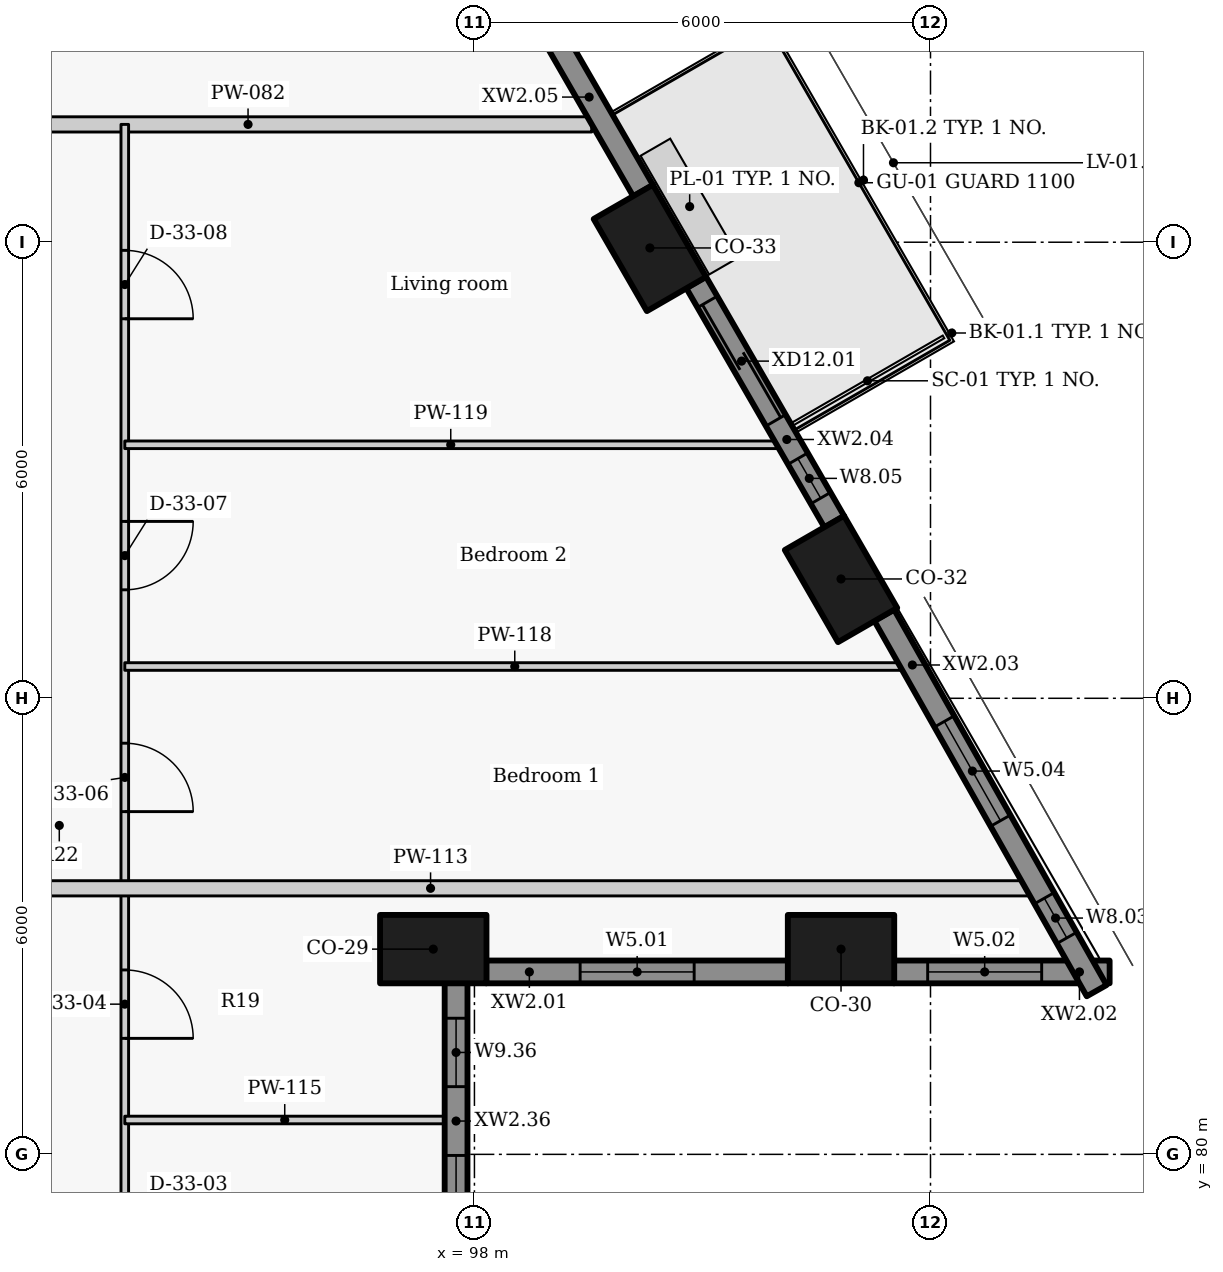
"""IFC4 building model, lengths in metres.
Left out: names, types, materials, properties, quantities, classifications, styles, units other than length and angle.
Written with IfcOpenShell. Run it as: python <this file> out.ifc"""

import sys

from ifc_helpers import new_model, si_unit, direction, frame, frame_2d, origin, origin_2d, place, context, subcontext, project, spatial, rectangle, extrude, element, fill, save


model = new_model("IFC4")
c1 = context("Model", 3, precision=1e-05, world=origin(), true_north=direction((0.0, 1.0)))
c2 = subcontext(c1, "Body", "Model", "MODEL_VIEW")
j1 = project(units=[si_unit("LENGTHUNIT", "METRE"), si_unit("PLANEANGLEUNIT", "RADIAN")], contexts=[c1])
p1 = place(None, origin())
s1 = spatial("IfcSite", under=j1, at=p1, CompositionType="ELEMENT")
p2 = place(p1, origin())
s2 = spatial("IfcBuilding", under=s1, at=p2, CompositionType="ELEMENT")
p3 = place(p2, frame((0.0, 0.0, 81.0)))
s3 = spatial("IfcBuildingStorey", under=s2, at=p3, CompositionType="ELEMENT", Elevation=81.0)
for number, where, z_axis, x_axis in (
    (1, (97.458, 82.7, 0.0), (0.0, 0.0, 1.0), (1.0, 0.0, 0.0)),
    (2, (102.823, 82.7, 0.0), (0.0, 0.0, 1.0), (1.0, 0.0, 0.0)),
    (3, (102.823, 87.57, 0.0), (0.0, 0.0, 1.0), (-0.5, 0.866, 0.0)),
    (4, (100.308, 91.925, 0.0), (0.0, 0.0, 1.0), (-0.5, 0.866, 0.0)),
):
    element("IfcColumn", number, at=place(p3, frame(where, z_axis=z_axis, x_axis=x_axis)), inside=s3, PredefinedType="COLUMN", context=c2, shape_type="SweptSolid", body=[
        extrude(rectangle(XDim=1.4, YDim=0.9, at=origin_2d()), origin(), (0.0, 0.0, 1.0), 3.3),
    ])
p4 = place(p3, frame((98.154, 82.4, 0.0), z_axis=(0.0, 0.0, 1.0), x_axis=(1.0, 0.0, 0.0)))
e5 = element("IfcWall", 5, at=p4, inside=s3, PredefinedType="SOLIDWALL", context=c2, shape_type="SweptSolid", body=[
    extrude(rectangle(XDim=3.973, YDim=0.3, at=frame_2d((1.986, 0.0))), origin(), (0.0, 0.0, 1.0), 2.425),
])
p5 = place(p4, frame((1.236, 0.0, 0.9)))
e6 = element("IfcOpeningElement", 6, at=p5, cuts=e5, PredefinedType="OPENING", context=c2, shape_type="SweptSolid", body=[
    extrude(rectangle(XDim=1.5, YDim=1.1, at=frame_2d((0.75, 0.55))), frame((0.0, 0.16, 0.0), z_axis=(0.0, -1.0, 0.0), x_axis=(1.0, 0.0, 0.0)), (0.0, 0.0, 1.0), 0.32),
])
p6 = place(p3, frame((103.519, 82.4, 0.0), z_axis=(0.0, 0.0, 1.0), x_axis=(1.0, 0.0, 0.0)))
e7 = element("IfcWall", 7, at=p6, inside=s3, PredefinedType="SOLIDWALL", context=c2, shape_type="SweptSolid", body=[
    extrude(rectangle(XDim=2.838, YDim=0.3, at=frame_2d((1.419, 0.0))), origin(), (0.0, 0.0, 1.0), 2.425),
])
p7 = place(p6, frame((0.444, 0.0, 0.9)))
e8 = element("IfcOpeningElement", 8, at=p7, cuts=e7, PredefinedType="OPENING", context=c2, shape_type="SweptSolid", body=[
    extrude(rectangle(XDim=1.5, YDim=1.1, at=frame_2d((0.75, 0.55))), frame((0.0, 0.16, 0.0), z_axis=(0.0, -1.0, 0.0), x_axis=(1.0, 0.0, 0.0)), (0.0, 0.0, 1.0), 0.32),
])
p8 = place(p3, frame((106.186, 82.153, 0.0), z_axis=(0.0, 0.0, 1.0), x_axis=(-0.492456858874, 0.870336855561, 0.0)))
e9 = element("IfcWall", 9, at=p8, inside=s3, PredefinedType="SOLIDWALL", context=c2, shape_type="SweptSolid", body=[
    extrude(rectangle(XDim=5.677, YDim=0.3, at=frame_2d((2.838, 0.0))), origin(), (0.0, 0.0, 1.0), 2.425),
])
p9 = place(p8, frame((0.798, 0.0, 0.9)))
e10 = element("IfcOpeningElement", 10, at=p9, cuts=e9, PredefinedType="OPENING", context=c2, shape_type="SweptSolid", body=[
    extrude(rectangle(XDim=0.6, YDim=1.1, at=frame_2d((0.3, 0.55))), frame((0.0, 0.16, 0.0), z_axis=(0.0, -1.0, 0.0), x_axis=(1.0, 0.0, 0.0)), (0.0, 0.0, 1.0), 0.32),
])
p10 = place(p8, frame((2.57, 0.0, 0.9)))
e11 = element("IfcOpeningElement", 11, at=p10, cuts=e9, PredefinedType="OPENING", context=c2, shape_type="SweptSolid", body=[
    extrude(rectangle(XDim=1.5, YDim=1.1, at=frame_2d((0.75, 0.55))), frame((0.0, 0.16, 0.0), z_axis=(0.0, -1.0, 0.0), x_axis=(1.0, 0.0, 0.0)), (0.0, 0.0, 1.0), 0.32),
])
p11 = place(p3, frame((102.735, 88.323, 0.0), z_axis=(0.0, 0.0, 1.0), x_axis=(-0.500009139881, 0.866020126807, 0.0)))
e12 = element("IfcWall", 12, at=p11, inside=s3, PredefinedType="SOLIDWALL", context=c2, shape_type="SweptSolid", body=[
    extrude(rectangle(XDim=3.637, YDim=0.3, at=frame_2d((1.818, 0.0))), origin(), (0.0, 0.0, 1.0), 2.425),
])
p12 = place(p11, frame((1.54, 0.0, 0.0)))
e13 = element("IfcOpeningElement", 13, at=p12, cuts=e12, PredefinedType="OPENING", context=c2, shape_type="SweptSolid", body=[
    extrude(rectangle(XDim=1.8, YDim=2.0, at=frame_2d((0.9, 1.0))), frame((0.0, 0.16, 0.0), z_axis=(0.0, -1.0, 0.0), x_axis=(1.0, 0.0, 0.0)), (0.0, 0.0, 1.0), 0.32),
])
p13 = place(p11, frame((0.359, 0.0, 0.9)))
e14 = element("IfcOpeningElement", 14, at=p13, cuts=e12, PredefinedType="OPENING", context=c2, shape_type="SweptSolid", body=[
    extrude(rectangle(XDim=0.6, YDim=1.1, at=frame_2d((0.3, 0.55))), frame((0.0, 0.16, 0.0), z_axis=(0.0, -1.0, 0.0), x_axis=(1.0, 0.0, 0.0)), (0.0, 0.0, 1.0), 0.32),
])
p14 = place(p3, frame((100.22, 92.677, 0.0), z_axis=(0.0, 0.0, 1.0), x_axis=(-0.499957037901, 0.866050206543, 0.0)))
e15 = element("IfcWall", 15, at=p14, inside=s3, PredefinedType="SOLIDWALL", context=c2, shape_type="SweptSolid", body=[
    extrude(rectangle(XDim=3.934, YDim=0.3, at=frame_2d((1.967, 0.0))), origin(), (0.0, 0.0, 1.0), 2.425),
])
p15 = place(p14, frame((2.945, 0.0, 0.9)))
e16 = element("IfcOpeningElement", 16, at=p15, cuts=e15, PredefinedType="OPENING", context=c2, shape_type="SweptSolid", body=[
    extrude(rectangle(XDim=0.6, YDim=1.1, at=frame_2d((0.3, 0.55))), frame((0.0, 0.16, 0.0), z_axis=(0.0, -1.0, 0.0), x_axis=(1.0, 0.0, 0.0)), (0.0, 0.0, 1.0), 0.32),
])
p16 = place(p3, frame((97.758, 77.996, 0.0), z_axis=(0.0, 0.0, 1.0), x_axis=(0.0, 1.0, 0.0)))
e17 = element("IfcWall", 17, at=p16, inside=s3, PredefinedType="SOLIDWALL", context=c2, shape_type="SweptSolid", body=[
    extrude(rectangle(XDim=4.258, YDim=0.3, at=frame_2d((2.129, 0.0))), origin(), (0.0, 0.0, 1.0), 2.425),
])
p17 = place(p16, frame((0.49, 0.0, 0.9)))
e18 = element("IfcOpeningElement", 18, at=p17, cuts=e17, PredefinedType="OPENING", context=c2, shape_type="SweptSolid", body=[
    extrude(rectangle(XDim=1.5, YDim=1.1, at=frame_2d((0.75, 0.55))), frame((0.0, 0.16, 0.0), z_axis=(0.0, -1.0, 0.0), x_axis=(1.0, 0.0, 0.0)), (0.0, 0.0, 1.0), 0.32),
])
p18 = place(p16, frame((2.895, 0.0, 0.9)))
e19 = element("IfcOpeningElement", 19, at=p18, cuts=e17, PredefinedType="OPENING", context=c2, shape_type="SweptSolid", body=[
    extrude(rectangle(XDim=0.9, YDim=1.1, at=frame_2d((0.45, 0.55))), frame((0.0, 0.16, 0.0), z_axis=(0.0, -1.0, 0.0), x_axis=(1.0, 0.0, 0.0)), (0.0, 0.0, 1.0), 0.32),
])
p19 = place(p3, frame((90.5, 93.55, 0.0), z_axis=(0.0, 0.0, 1.0), x_axis=(1.0, 0.0, 0.0)))
e20 = element("IfcWall", 20, at=p19, inside=s3, PredefinedType="PARTITIONING", context=c2, shape_type="SweptSolid", body=[
    extrude(rectangle(XDim=9.043, YDim=0.2, at=frame_2d((4.521, 0.0))), origin(), (0.0, 0.0, 1.0), 2.405),
])
p20 = place(p3, frame((93.4, 93.55, 0.0), z_axis=(0.0, 0.0, 1.0), x_axis=(0.0, -1.0, 0.0)))
e21 = element("IfcWall", 21, at=p20, inside=s3, PredefinedType="PARTITIONING", context=c2, shape_type="SweptSolid", body=[
    extrude(rectangle(XDim=20.55, YDim=0.1, at=frame_2d((10.275, 0.0))), origin(), (0.0, 0.0, 1.0), 3.025),
])
p21 = place(p20, frame((17.898, 0.0, 0.0)))
e22 = element("IfcOpeningElement", 22, at=p21, cuts=e21, PredefinedType="OPENING", context=c2, shape_type="SweptSolid", body=[
    extrude(rectangle(XDim=0.9, YDim=2.1, at=frame_2d((0.45, 1.05))), frame((0.0, 0.06, 0.0), z_axis=(0.0, -1.0, 0.0), x_axis=(1.0, 0.0, 0.0)), (0.0, 0.0, 1.0), 0.12),
])
p22 = place(p20, frame((14.173, 0.0, 0.0)))
e23 = element("IfcOpeningElement", 23, at=p22, cuts=e21, PredefinedType="OPENING", context=c2, shape_type="SweptSolid", body=[
    extrude(rectangle(XDim=0.9, YDim=2.1, at=frame_2d((0.45, 1.05))), frame((0.0, 0.06, 0.0), z_axis=(0.0, -1.0, 0.0), x_axis=(1.0, 0.0, 0.0)), (0.0, 0.0, 1.0), 0.12),
])
p23 = place(p20, frame((11.124, 0.0, 0.0)))
e24 = element("IfcOpeningElement", 24, at=p23, cuts=e21, PredefinedType="OPENING", context=c2, shape_type="SweptSolid", body=[
    extrude(rectangle(XDim=0.9, YDim=2.1, at=frame_2d((0.45, 1.05))), frame((0.0, 0.06, 0.0), z_axis=(0.0, -1.0, 0.0), x_axis=(1.0, 0.0, 0.0)), (0.0, 0.0, 1.0), 0.12),
])
p24 = place(p20, frame((8.141, 0.0, 0.0)))
e25 = element("IfcOpeningElement", 25, at=p24, cuts=e21, PredefinedType="OPENING", context=c2, shape_type="SweptSolid", body=[
    extrude(rectangle(XDim=0.9, YDim=2.1, at=frame_2d((0.45, 1.05))), frame((0.0, 0.06, 0.0), z_axis=(0.0, -1.0, 0.0), x_axis=(1.0, 0.0, 0.0)), (0.0, 0.0, 1.0), 0.12),
])
p25 = place(p20, frame((5.223, 0.0, 0.0)))
e26 = element("IfcOpeningElement", 26, at=p25, cuts=e21, PredefinedType="OPENING", context=c2, shape_type="SweptSolid", body=[
    extrude(rectangle(XDim=0.9, YDim=2.1, at=frame_2d((0.45, 1.05))), frame((0.0, 0.06, 0.0), z_axis=(0.0, -1.0, 0.0), x_axis=(1.0, 0.0, 0.0)), (0.0, 0.0, 1.0), 0.12),
])
p26 = place(p20, frame((1.657, 0.0, 0.0)))
e27 = element("IfcOpeningElement", 27, at=p26, cuts=e21, PredefinedType="OPENING", context=c2, shape_type="SweptSolid", body=[
    extrude(rectangle(XDim=0.9, YDim=2.1, at=frame_2d((0.45, 1.05))), frame((0.0, 0.06, 0.0), z_axis=(0.0, -1.0, 0.0), x_axis=(1.0, 0.0, 0.0)), (0.0, 0.0, 1.0), 0.12),
])
p27 = place(p3, frame((89.5, 83.5, 0.0), z_axis=(0.0, 0.0, 1.0), x_axis=(1.0, 0.0, 0.0)))
e28 = element("IfcWall", 28, at=p27, inside=s3, PredefinedType="PARTITIONING", context=c2, shape_type="SweptSolid", body=[
    extrude(rectangle(XDim=15.846, YDim=0.2, at=frame_2d((7.923, 0.0))), origin(), (0.0, 0.0, 1.0), 2.405),
])
p28 = place(p3, frame((93.4, 80.452, 0.0), z_axis=(0.0, 0.0, 1.0), x_axis=(1.0, 0.0, 0.0)))
e29 = element("IfcWall", 29, at=p28, inside=s3, PredefinedType="PARTITIONING", context=c2, shape_type="SweptSolid", body=[
    extrude(rectangle(XDim=4.208, YDim=0.1, at=frame_2d((2.104, 0.0))), origin(), (0.0, 0.0, 1.0), 2.405),
])
p29 = place(p3, frame((93.4, 86.418, 0.0), z_axis=(0.0, 0.0, 1.0), x_axis=(1.0, 0.0, 0.0)))
e30 = element("IfcWall", 30, at=p29, inside=s3, PredefinedType="PARTITIONING", context=c2, shape_type="SweptSolid", body=[
    extrude(rectangle(XDim=10.261, YDim=0.1, at=frame_2d((5.131, 0.0))), origin(), (0.0, 0.0, 1.0), 2.405),
])
p30 = place(p3, frame((93.4, 89.335, 0.0), z_axis=(0.0, 0.0, 1.0), x_axis=(1.0, 0.0, 0.0)))
e31 = element("IfcWall", 31, at=p30, inside=s3, PredefinedType="PARTITIONING", context=c2, shape_type="SweptSolid", body=[
    extrude(rectangle(XDim=8.577, YDim=0.1, at=frame_2d((4.288, 0.0))), origin(), (0.0, 0.0, 1.0), 2.405),
])
p31 = place(p5, origin())
e32 = element("IfcWindow", 32, at=p31, inside=s3, PartitioningType="SINGLE_PANEL", PredefinedType="WINDOW", context=c2, shape_type="SweptSolid", body=[
    extrude(rectangle(XDim=1.5, YDim=1.1, at=frame_2d((0.75, 0.55))), frame((0.0, 0.03, 0.0), z_axis=(0.0, -1.0, 0.0), x_axis=(1.0, 0.0, 0.0)), (0.0, 0.0, 1.0), 0.06),
])
fill(e6, e32)
p32 = place(p7, origin())
e33 = element("IfcWindow", 33, at=p32, inside=s3, PartitioningType="SINGLE_PANEL", PredefinedType="WINDOW", context=c2, shape_type="SweptSolid", body=[
    extrude(rectangle(XDim=1.5, YDim=1.1, at=frame_2d((0.75, 0.55))), frame((0.0, 0.03, 0.0), z_axis=(0.0, -1.0, 0.0), x_axis=(1.0, 0.0, 0.0)), (0.0, 0.0, 1.0), 0.06),
])
fill(e8, e33)
p33 = place(p9, origin())
e34 = element("IfcWindow", 34, at=p33, inside=s3, PartitioningType="SINGLE_PANEL", PredefinedType="WINDOW", context=c2, shape_type="SweptSolid", body=[
    extrude(rectangle(XDim=0.6, YDim=1.1, at=frame_2d((0.3, 0.55))), frame((0.0, 0.03, 0.0), z_axis=(0.0, -1.0, 0.0), x_axis=(1.0, 0.0, 0.0)), (0.0, 0.0, 1.0), 0.06),
])
fill(e10, e34)
p34 = place(p10, origin())
e35 = element("IfcWindow", 35, at=p34, inside=s3, PartitioningType="SINGLE_PANEL", PredefinedType="WINDOW", context=c2, shape_type="SweptSolid", body=[
    extrude(rectangle(XDim=1.5, YDim=1.1, at=frame_2d((0.75, 0.55))), frame((0.0, 0.03, 0.0), z_axis=(0.0, -1.0, 0.0), x_axis=(1.0, 0.0, 0.0)), (0.0, 0.0, 1.0), 0.06),
])
fill(e11, e35)
p35 = place(p12, origin())
e36 = element("IfcDoor", 36, at=p35, inside=s3, OperationType="SLIDING_TO_LEFT", PredefinedType="DOOR", context=c2, shape_type="SweptSolid", body=[
    extrude(rectangle(XDim=1.8, YDim=2.0, at=frame_2d((0.9, 1.0))), frame((0.0, 0.025, 0.0), z_axis=(0.0, -1.0, 0.0), x_axis=(1.0, 0.0, 0.0)), (0.0, 0.0, 1.0), 0.05),
])
fill(e13, e36)
p36 = place(p13, origin())
e37 = element("IfcWindow", 37, at=p36, inside=s3, PartitioningType="SINGLE_PANEL", PredefinedType="WINDOW", context=c2, shape_type="SweptSolid", body=[
    extrude(rectangle(XDim=0.6, YDim=1.1, at=frame_2d((0.3, 0.55))), frame((0.0, 0.03, 0.0), z_axis=(0.0, -1.0, 0.0), x_axis=(1.0, 0.0, 0.0)), (0.0, 0.0, 1.0), 0.06),
])
fill(e14, e37)
p37 = place(p17, origin())
e38 = element("IfcWindow", 38, at=p37, inside=s3, PartitioningType="SINGLE_PANEL", PredefinedType="WINDOW", context=c2, shape_type="SweptSolid", body=[
    extrude(rectangle(XDim=1.5, YDim=1.1, at=frame_2d((0.75, 0.55))), frame((0.0, 0.03, 0.0), z_axis=(0.0, -1.0, 0.0), x_axis=(1.0, 0.0, 0.0)), (0.0, 0.0, 1.0), 0.06),
])
fill(e18, e38)
p38 = place(p18, origin())
e39 = element("IfcWindow", 39, at=p38, inside=s3, PartitioningType="SINGLE_PANEL", PredefinedType="WINDOW", context=c2, shape_type="SweptSolid", body=[
    extrude(rectangle(XDim=0.9, YDim=1.1, at=frame_2d((0.45, 0.55))), frame((0.0, 0.03, 0.0), z_axis=(0.0, -1.0, 0.0), x_axis=(1.0, 0.0, 0.0)), (0.0, 0.0, 1.0), 0.06),
])
fill(e19, e39)
p39 = place(p23, origin())
e40 = element("IfcDoor", 40, at=p39, inside=s3, OperationType="SINGLE_SWING_RIGHT", PredefinedType="DOOR", context=c2, shape_type="SweptSolid", body=[
    extrude(rectangle(XDim=0.9, YDim=2.1, at=frame_2d((0.45, 1.05))), frame((0.0, 0.025, 0.0), z_axis=(0.0, -1.0, 0.0), x_axis=(1.0, 0.0, 0.0)), (0.0, 0.0, 1.0), 0.05),
])
fill(e24, e40)
p40 = place(p24, origin())
e41 = element("IfcDoor", 41, at=p40, inside=s3, OperationType="SINGLE_SWING_RIGHT", PredefinedType="DOOR", context=c2, shape_type="SweptSolid", body=[
    extrude(rectangle(XDim=0.9, YDim=2.1, at=frame_2d((0.45, 1.05))), frame((0.0, 0.025, 0.0), z_axis=(0.0, -1.0, 0.0), x_axis=(1.0, 0.0, 0.0)), (0.0, 0.0, 1.0), 0.05),
])
fill(e25, e41)
p41 = place(p25, origin())
e42 = element("IfcDoor", 42, at=p41, inside=s3, OperationType="SINGLE_SWING_LEFT", PredefinedType="DOOR", context=c2, shape_type="SweptSolid", body=[
    extrude(rectangle(XDim=0.9, YDim=2.1, at=frame_2d((0.45, 1.05))), frame((0.0, 0.025, 0.0), z_axis=(0.0, -1.0, 0.0), x_axis=(1.0, 0.0, 0.0)), (0.0, 0.0, 1.0), 0.05),
])
fill(e26, e42)
p42 = place(p26, origin())
e43 = element("IfcDoor", 43, at=p42, inside=s3, OperationType="SINGLE_SWING_RIGHT", PredefinedType="DOOR", context=c2, shape_type="SweptSolid", body=[
    extrude(rectangle(XDim=0.9, YDim=2.1, at=frame_2d((0.45, 1.05))), frame((0.0, 0.025, 0.0), z_axis=(0.0, -1.0, 0.0), x_axis=(1.0, 0.0, 0.0)), (0.0, 0.0, 1.0), 0.05),
])
fill(e27, e43)
save(model, sys.argv[1])
